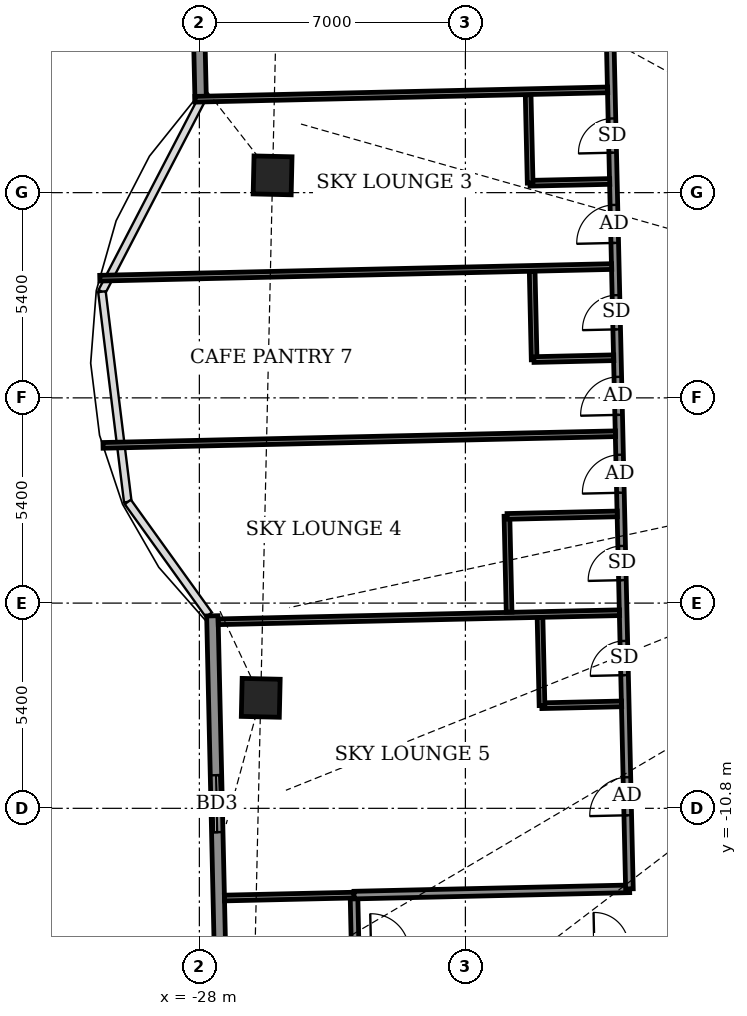
"""IFC4 building model, lengths in metres.
Left out: names, types, materials, properties, quantities, classifications, styles, units other than length and angle.
Written with IfcOpenShell. Run it as: python <this file> out.ifc"""

import sys

from ifc_helpers import new_model, si_unit, direction, frame, frame_2d, origin, origin_2d, place, context, subcontext, project, spatial, rectangle, extrude, element, fill, save


model = new_model("IFC4")
c1 = context("Model", 3, precision=1e-05, world=origin(), true_north=direction((0.0, 1.0)))
c2 = subcontext(c1, "Body", "Model", "MODEL_VIEW")
j1 = project(units=[si_unit("LENGTHUNIT", "METRE"), si_unit("PLANEANGLEUNIT", "RADIAN")], contexts=[c1])
p1 = place(None, origin())
s1 = spatial("IfcSite", under=j1, at=p1, CompositionType="ELEMENT")
p2 = place(p1, origin())
s2 = spatial("IfcBuilding", under=s1, at=p2, CompositionType="ELEMENT")
p3 = place(p2, frame((0.0, 0.0, 275.3)))
s3 = spatial("IfcBuildingStorey", under=s2, at=p3, CompositionType="ELEMENT", Elevation=275.3)
for number, where, z_axis, x_axis in (
    (1, (-26.385, -7.892, -0.55), (0.0, 0.0, 1.0), (-0.023, -1.0, 0.0)),
    (2, (-26.073, 5.855, -0.55), (0.0, 0.0, 1.0), (-0.023, -1.0, 0.0)),
):
    element("IfcColumn", number, at=place(p3, frame(where, z_axis=z_axis, x_axis=x_axis)), inside=s3, PredefinedType="COLUMN", context=c2, shape_type="SweptSolid", body=[
        extrude(rectangle(XDim=1.0, YDim=1.0, at=origin_2d()), origin(), (0.0, 0.0, 1.0), 4.6),
    ])
p4 = place(p3, frame((-28.297, 22.427, 0.0), z_axis=(0.0, 0.0, 1.0), x_axis=(0.02269714286, -0.999742386671, 0.0)))
e3 = element("IfcWall", 3, at=p4, inside=s3, PredefinedType="SOLIDWALL", context=c2, shape_type="SweptSolid", body=[
    extrude(rectangle(XDim=14.629, YDim=0.3, at=frame_2d((7.314, 0.0))), origin(), (0.0, 0.0, 1.0), 2.75),
])
p5 = place(p4, frame((3.7, 0.0, 0.0)))
e4 = element("IfcOpeningElement", 4, at=p5, cuts=e3, PredefinedType="OPENING", context=c2, shape_type="SweptSolid", body=[
    extrude(rectangle(XDim=1.5, YDim=2.4, at=frame_2d((0.75, 1.2))), frame((0.0, 0.16, 0.0), z_axis=(0.0, -1.0, 0.0), x_axis=(1.0, 0.0, 0.0)), (0.0, 0.0, 1.0), 0.32),
])
p6 = place(p4, frame((10.612, 0.0, 0.9)))
e5 = element("IfcOpeningElement", 5, at=p6, cuts=e3, PredefinedType="OPENING", context=c2, shape_type="SweptSolid", body=[
    extrude(rectangle(XDim=2.4, YDim=1.5, at=frame_2d((1.2, 0.75))), frame((0.0, 0.16, 0.0), z_axis=(0.0, -1.0, 0.0), x_axis=(1.0, 0.0, 0.0)), (0.0, 0.0, 1.0), 0.32),
])
p7 = place(p3, frame((-27.658, -5.735, 0.0), z_axis=(0.0, 0.0, 1.0), x_axis=(0.022670092247, -0.999743000434, 0.0)))
e6 = element("IfcWall", 6, at=p7, inside=s3, PredefinedType="SOLIDWALL", context=c2, shape_type="SweptSolid", body=[
    extrude(rectangle(XDim=15.131, YDim=0.3, at=frame_2d((7.565, 0.0))), origin(), (0.0, 0.0, 1.0), 2.35),
])
p8 = place(p7, frame((4.194, 0.0, 0.0)))
e7 = element("IfcOpeningElement", 7, at=p8, cuts=e6, PredefinedType="OPENING", context=c2, shape_type="SweptSolid", body=[
    extrude(rectangle(XDim=1.5, YDim=2.0, at=frame_2d((0.75, 1.0))), frame((0.0, 0.16, 0.0), z_axis=(0.0, -1.0, 0.0), x_axis=(1.0, 0.0, 0.0)), (0.0, 0.0, 1.0), 0.32),
])
p9 = place(p7, frame((11.846, 0.0, 0.5)))
e8 = element("IfcOpeningElement", 8, at=p9, cuts=e6, PredefinedType="OPENING", context=c2, shape_type="SweptSolid", body=[
    extrude(rectangle(XDim=1.2, YDim=1.1, at=frame_2d((0.6, 0.55))), frame((0.0, 0.16, 0.0), z_axis=(0.0, -1.0, 0.0), x_axis=(1.0, 0.0, 0.0)), (0.0, 0.0, 1.0), 0.32),
])
p10 = place(p3, frame((-30.121, -19.075, 0.0), z_axis=(0.0, 0.0, 1.0), x_axis=(-0.022665943652, 0.999743094499, 0.0)))
e9 = element("IfcWall", 9, at=p10, inside=s3, PredefinedType="USERDEFINED", context=c2, shape_type="SweptSolid", body=[
    extrude(rectangle(XDim=6.0, YDim=0.55, at=frame_2d((3.0, 0.0))), origin(), (0.0, 0.0, 1.0), 0.8),
])
p11 = place(p3, frame((-23.898, -14.583, 0.0), z_axis=(0.0, 0.0, 1.0), x_axis=(-0.022617910375, 0.999744182344, 0.0)))
e10 = element("IfcWall", 10, at=p11, inside=s3, PredefinedType="PARTITIONING", context=c2, shape_type="SweptSolid", body=[
    extrude(rectangle(XDim=1.5, YDim=0.2, at=frame_2d((0.75, 0.0))), origin(), (0.0, 0.0, 1.0), 2.65),
])
p12 = place(p3, frame((-23.895, -14.583, 0.0), z_axis=(0.0, 0.0, 1.0), x_axis=(0.999742444101, 0.022694613067, 0.0)))
e11 = element("IfcWall", 11, at=p12, inside=s3, PredefinedType="PARTITIONING", context=c2, shape_type="SweptSolid", body=[
    extrude(rectangle(XDim=54.025, YDim=0.2, at=frame_2d((27.012, 0.0))), origin(), (0.0, 0.0, 1.0), 2.1),
])
p13 = place(p12, frame((0.414, 0.0, 0.0)))
e12 = element("IfcOpeningElement", 12, at=p13, cuts=e11, PredefinedType="OPENING", context=c2, shape_type="SweptSolid", body=[
    extrude(rectangle(XDim=1.0, YDim=2.1, at=frame_2d((0.5, 1.05))), frame((0.0, 0.11, 0.0), z_axis=(0.0, -1.0, 0.0), x_axis=(1.0, 0.0, 0.0)), (0.0, 0.0, 1.0), 0.22),
])
p14 = place(p12, frame((6.289, 0.0, 0.0)))
e13 = element("IfcOpeningElement", 13, at=p14, cuts=e11, PredefinedType="OPENING", context=c2, shape_type="SweptSolid", body=[
    extrude(rectangle(XDim=0.9, YDim=2.1, at=frame_2d((0.45, 1.05))), frame((0.0, 0.11, 0.0), z_axis=(0.0, -1.0, 0.0), x_axis=(1.0, 0.0, 0.0)), (0.0, 0.0, 1.0), 0.22),
])
p15 = place(p12, frame((11.589, 0.0, 0.0)))
e14 = element("IfcOpeningElement", 14, at=p15, cuts=e11, PredefinedType="OPENING", context=c2, shape_type="SweptSolid", body=[
    extrude(rectangle(XDim=1.0, YDim=2.1, at=frame_2d((0.5, 1.05))), frame((0.0, 0.11, 0.0), z_axis=(0.0, -1.0, 0.0), x_axis=(1.0, 0.0, 0.0)), (0.0, 0.0, 1.0), 0.22),
])
p16 = place(p12, frame((8.689, 0.0, 0.0)))
e15 = element("IfcOpeningElement", 15, at=p16, cuts=e11, PredefinedType="OPENING", context=c2, shape_type="SweptSolid", body=[
    extrude(rectangle(XDim=0.9, YDim=2.1, at=frame_2d((0.45, 1.05))), frame((0.0, 0.11, 0.0), z_axis=(0.0, -1.0, 0.0), x_axis=(1.0, 0.0, 0.0)), (0.0, 0.0, 1.0), 0.22),
])
p17 = place(p12, frame((15.014, 0.0, 0.0)))
e16 = element("IfcOpeningElement", 16, at=p17, cuts=e11, PredefinedType="OPENING", context=c2, shape_type="SweptSolid", body=[
    extrude(rectangle(XDim=1.0, YDim=2.1, at=frame_2d((0.5, 1.05))), frame((0.0, 0.11, 0.0), z_axis=(0.0, -1.0, 0.0), x_axis=(1.0, 0.0, 0.0)), (0.0, 0.0, 1.0), 0.22),
])
p18 = place(p12, frame((18.039, 0.0, 0.0)))
e17 = element("IfcOpeningElement", 17, at=p18, cuts=e11, PredefinedType="OPENING", context=c2, shape_type="SweptSolid", body=[
    extrude(rectangle(XDim=0.9, YDim=2.1, at=frame_2d((0.45, 1.05))), frame((0.0, 0.11, 0.0), z_axis=(0.0, -1.0, 0.0), x_axis=(1.0, 0.0, 0.0)), (0.0, 0.0, 1.0), 0.22),
])
p19 = place(p12, frame((22.989, 0.0, 0.0)))
e18 = element("IfcOpeningElement", 18, at=p19, cuts=e11, PredefinedType="OPENING", context=c2, shape_type="SweptSolid", body=[
    extrude(rectangle(XDim=0.9, YDim=2.1, at=frame_2d((0.45, 1.05))), frame((0.0, 0.11, 0.0), z_axis=(0.0, -1.0, 0.0), x_axis=(1.0, 0.0, 0.0)), (0.0, 0.0, 1.0), 0.22),
])
p20 = place(p12, frame((25.514, 0.0, 0.0)))
e19 = element("IfcOpeningElement", 19, at=p20, cuts=e11, PredefinedType="OPENING", context=c2, shape_type="SweptSolid", body=[
    extrude(rectangle(XDim=0.9, YDim=2.1, at=frame_2d((0.45, 1.05))), frame((0.0, 0.11, 0.0), z_axis=(0.0, -1.0, 0.0), x_axis=(1.0, 0.0, 0.0)), (0.0, 0.0, 1.0), 0.22),
])
p21 = place(p12, frame((32.839, 0.0, 0.0)))
e20 = element("IfcOpeningElement", 20, at=p21, cuts=e11, PredefinedType="OPENING", context=c2, shape_type="SweptSolid", body=[
    extrude(rectangle(XDim=0.9, YDim=2.1, at=frame_2d((0.45, 1.05))), frame((0.0, 0.11, 0.0), z_axis=(0.0, -1.0, 0.0), x_axis=(1.0, 0.0, 0.0)), (0.0, 0.0, 1.0), 0.22),
])
p22 = place(p12, frame((35.364, 0.0, 0.0)))
e21 = element("IfcOpeningElement", 21, at=p22, cuts=e11, PredefinedType="OPENING", context=c2, shape_type="SweptSolid", body=[
    extrude(rectangle(XDim=0.9, YDim=2.1, at=frame_2d((0.45, 1.05))), frame((0.0, 0.11, 0.0), z_axis=(0.0, -1.0, 0.0), x_axis=(1.0, 0.0, 0.0)), (0.0, 0.0, 1.0), 0.22),
])
p23 = place(p12, frame((43.939, 0.0, 0.0)))
e22 = element("IfcOpeningElement", 22, at=p23, cuts=e11, PredefinedType="OPENING", context=c2, shape_type="SweptSolid", body=[
    extrude(rectangle(XDim=1.0, YDim=2.1, at=frame_2d((0.5, 1.05))), frame((0.0, 0.11, 0.0), z_axis=(0.0, -1.0, 0.0), x_axis=(1.0, 0.0, 0.0)), (0.0, 0.0, 1.0), 0.22),
])
p24 = place(p12, frame((40.339, 0.0, 0.0)))
e23 = element("IfcOpeningElement", 23, at=p24, cuts=e11, PredefinedType="OPENING", context=c2, shape_type="SweptSolid", body=[
    extrude(rectangle(XDim=0.9, YDim=2.1, at=frame_2d((0.45, 1.05))), frame((0.0, 0.11, 0.0), z_axis=(0.0, -1.0, 0.0), x_axis=(1.0, 0.0, 0.0)), (0.0, 0.0, 1.0), 0.22),
])
p25 = place(p12, frame((50.035, 0.0, 0.0)))
e24 = element("IfcOpeningElement", 24, at=p25, cuts=e11, PredefinedType="OPENING", context=c2, shape_type="SweptSolid", body=[
    extrude(rectangle(XDim=1.0, YDim=2.1, at=frame_2d((0.5, 1.05))), frame((0.0, 0.11, 0.0), z_axis=(0.0, -1.0, 0.0), x_axis=(1.0, 0.0, 0.0)), (0.0, 0.0, 1.0), 0.22),
])
p26 = place(p3, frame((-27.34, -13.16, 0.0), z_axis=(0.0, 0.0, 1.0), x_axis=(0.999745956294, 0.022539362742, 0.0)))
e25 = element("IfcWall", 25, at=p26, inside=s3, PredefinedType="PARTITIONING", context=c2, shape_type="SweptSolid", body=[
    extrude(rectangle(XDim=3.412, YDim=0.15, at=frame_2d((1.706, 0.0))), origin(), (0.0, 0.0, 1.0), 2.35),
])
p27 = place(p3, frame((-23.929, -13.083, 0.0), z_axis=(0.0, 0.0, 1.0), x_axis=(0.999741000612, 0.022758112756, 0.0)))
e26 = element("IfcWall", 26, at=p27, inside=s3, PredefinedType="PARTITIONING", context=c2, shape_type="SweptSolid", body=[
    extrude(rectangle(XDim=7.252, YDim=0.2, at=frame_2d((3.626, 0.0))), origin(), (0.0, 0.0, 1.0), 2.55),
])
p28 = place(p3, frame((-16.684, -12.919, 0.0), z_axis=(0.0, 0.0, 1.0), x_axis=(-0.022712214871, 0.999742044377, 0.0)))
e27 = element("IfcWall", 27, at=p28, inside=s3, PredefinedType="PARTITIONING", context=c2, shape_type="SweptSolid", body=[
    extrude(rectangle(XDim=26.551, YDim=0.2, at=frame_2d((13.275, 0.0))), origin(), (0.0, 0.0, 1.0), 2.55),
])
p29 = place(p28, frame((22.088, 0.0, 0.0)))
e28 = element("IfcOpeningElement", 28, at=p29, cuts=e27, PredefinedType="OPENING", context=c2, shape_type="SweptSolid", body=[
    extrude(rectangle(XDim=1.0, YDim=2.1, at=frame_2d((0.5, 1.05))), frame((0.0, 0.11, 0.0), z_axis=(0.0, -1.0, 0.0), x_axis=(1.0, 0.0, 0.0)), (0.0, 0.0, 1.0), 0.22),
])
p30 = place(p28, frame((24.9, 0.0, 0.0)))
e29 = element("IfcOpeningElement", 29, at=p30, cuts=e27, PredefinedType="OPENING", context=c2, shape_type="SweptSolid", body=[
    extrude(rectangle(XDim=0.9, YDim=2.1, at=frame_2d((0.45, 1.05))), frame((0.0, 0.11, 0.0), z_axis=(0.0, -1.0, 0.0), x_axis=(1.0, 0.0, 0.0)), (0.0, 0.0, 1.0), 0.22),
])
p31 = place(p28, frame((17.0, 0.0, 0.0)))
e30 = element("IfcOpeningElement", 30, at=p31, cuts=e27, PredefinedType="OPENING", context=c2, shape_type="SweptSolid", body=[
    extrude(rectangle(XDim=1.0, YDim=2.1, at=frame_2d((0.5, 1.05))), frame((0.0, 0.11, 0.0), z_axis=(0.0, -1.0, 0.0), x_axis=(1.0, 0.0, 0.0)), (0.0, 0.0, 1.0), 0.22),
])
p32 = place(p28, frame((19.375, 0.0, 0.0)))
e31 = element("IfcOpeningElement", 31, at=p32, cuts=e27, PredefinedType="OPENING", context=c2, shape_type="SweptSolid", body=[
    extrude(rectangle(XDim=0.9, YDim=2.1, at=frame_2d((0.45, 1.05))), frame((0.0, 0.11, 0.0), z_axis=(0.0, -1.0, 0.0), x_axis=(1.0, 0.0, 0.0)), (0.0, 0.0, 1.0), 0.22),
])
p33 = place(p28, frame((12.475, 0.0, 0.0)))
e32 = element("IfcOpeningElement", 32, at=p33, cuts=e27, PredefinedType="OPENING", context=c2, shape_type="SweptSolid", body=[
    extrude(rectangle(XDim=1.0, YDim=2.1, at=frame_2d((0.5, 1.05))), frame((0.0, 0.11, 0.0), z_axis=(0.0, -1.0, 0.0), x_axis=(1.0, 0.0, 0.0)), (0.0, 0.0, 1.0), 0.22),
])
p34 = place(p28, frame((14.725, 0.0, 0.0)))
e33 = element("IfcOpeningElement", 33, at=p34, cuts=e27, PredefinedType="OPENING", context=c2, shape_type="SweptSolid", body=[
    extrude(rectangle(XDim=0.9, YDim=2.1, at=frame_2d((0.45, 1.05))), frame((0.0, 0.11, 0.0), z_axis=(0.0, -1.0, 0.0), x_axis=(1.0, 0.0, 0.0)), (0.0, 0.0, 1.0), 0.22),
])
p35 = place(p28, frame((10.425, 0.0, 0.0)))
e34 = element("IfcOpeningElement", 34, at=p35, cuts=e27, PredefinedType="OPENING", context=c2, shape_type="SweptSolid", body=[
    extrude(rectangle(XDim=1.0, YDim=2.1, at=frame_2d((0.5, 1.05))), frame((0.0, 0.11, 0.0), z_axis=(0.0, -1.0, 0.0), x_axis=(1.0, 0.0, 0.0)), (0.0, 0.0, 1.0), 0.22),
])
p36 = place(p28, frame((8.125, 0.0, 0.0)))
e35 = element("IfcOpeningElement", 35, at=p36, cuts=e27, PredefinedType="OPENING", context=c2, shape_type="SweptSolid", body=[
    extrude(rectangle(XDim=0.9, YDim=2.1, at=frame_2d((0.45, 1.05))), frame((0.0, 0.11, 0.0), z_axis=(0.0, -1.0, 0.0), x_axis=(1.0, 0.0, 0.0)), (0.0, 0.0, 1.0), 0.22),
])
p37 = place(p28, frame((1.937, 0.0, 0.0)))
e36 = element("IfcOpeningElement", 36, at=p37, cuts=e27, PredefinedType="OPENING", context=c2, shape_type="SweptSolid", body=[
    extrude(rectangle(XDim=1.0, YDim=2.1, at=frame_2d((0.5, 1.05))), frame((0.0, 0.11, 0.0), z_axis=(0.0, -1.0, 0.0), x_axis=(1.0, 0.0, 0.0)), (0.0, 0.0, 1.0), 0.22),
])
p38 = place(p28, frame((5.625, 0.0, 0.0)))
e37 = element("IfcOpeningElement", 37, at=p38, cuts=e27, PredefinedType="OPENING", context=c2, shape_type="SweptSolid", body=[
    extrude(rectangle(XDim=0.9, YDim=2.1, at=frame_2d((0.45, 1.05))), frame((0.0, 0.11, 0.0), z_axis=(0.0, -1.0, 0.0), x_axis=(1.0, 0.0, 0.0)), (0.0, 0.0, 1.0), 0.22),
])
p39 = place(p3, frame((-18.989, -8.1, 0.0), z_axis=(0.0, 0.0, 1.0), x_axis=(0.999737616439, 0.022906293375, 0.0)))
e38 = element("IfcWall", 38, at=p39, inside=s3, PredefinedType="PARTITIONING", context=c2, shape_type="SweptSolid", body=[
    extrude(rectangle(XDim=2.1, YDim=0.15, at=frame_2d((1.05, 0.0))), origin(), (0.0, 0.0, 1.0), 2.75),
])
p40 = place(p3, frame((-18.984, -8.095, 0.0), z_axis=(0.0, 0.0, 1.0), x_axis=(-0.022885950011, 0.999738082346, 0.0)))
e39 = element("IfcWall", 39, at=p40, inside=s3, PredefinedType="PARTITIONING", context=c2, shape_type="SweptSolid", body=[
    extrude(rectangle(XDim=2.325, YDim=0.15, at=frame_2d((1.163, 0.0))), origin(), (0.0, 0.0, 1.0), 2.75),
])
p41 = place(p3, frame((-27.504, -5.892, 0.0), z_axis=(0.0, 0.0, 1.0), x_axis=(0.999743943334, 0.022628472488, 0.0)))
e40 = element("IfcWall", 40, at=p41, inside=s3, PredefinedType="PARTITIONING", context=c2, shape_type="SweptSolid", body=[
    extrude(rectangle(XDim=10.562, YDim=0.15, at=frame_2d((5.281, 0.0))), origin(), (0.0, 0.0, 1.0), 2.35),
])
p42 = place(p3, frame((-19.85, -5.639, 0.0), z_axis=(0.0, 0.0, 1.0), x_axis=(-0.022523775833, 0.999746307581, 0.0)))
e41 = element("IfcWall", 41, at=p42, inside=s3, PredefinedType="PARTITIONING", context=c2, shape_type="SweptSolid", body=[
    extrude(rectangle(XDim=2.526, YDim=0.15, at=frame_2d((1.263, 0.0))), origin(), (0.0, 0.0, 1.0), 2.85),
])
p43 = place(p3, frame((-19.902, -3.119, 0.0), z_axis=(0.0, 0.0, 1.0), x_axis=(0.999741618182, 0.022730967319, 0.0)))
e42 = element("IfcWall", 42, at=p43, inside=s3, PredefinedType="PARTITIONING", context=c2, shape_type="SweptSolid", body=[
    extrude(rectangle(XDim=2.9, YDim=0.15, at=frame_2d((1.45, 0.0))), origin(), (0.0, 0.0, 1.0), 2.85),
])
p44 = place(p3, frame((-30.535, -1.25, 0.0), z_axis=(0.0, 0.0, 1.0), x_axis=(0.999742750552, 0.022681109296, 0.0)))
e43 = element("IfcWall", 43, at=p44, inside=s3, PredefinedType="PARTITIONING", context=c2, shape_type="SweptSolid", body=[
    extrude(rectangle(XDim=13.487, YDim=0.15, at=frame_2d((6.744, 0.0))), origin(), (0.0, 0.0, 1.0), 0.93),
])
p45 = place(p3, frame((-19.191, 1.003, 0.0), z_axis=(0.0, 0.0, 1.0), x_axis=(-0.022361308448, 0.999749954681, 0.0)))
e44 = element("IfcWall", 44, at=p45, inside=s3, PredefinedType="PARTITIONING", context=c2, shape_type="SweptSolid", body=[
    extrude(rectangle(XDim=2.325, YDim=0.15, at=frame_2d((1.163, 0.0))), origin(), (0.0, 0.0, 1.0), 4.05),
])
p46 = place(p3, frame((-19.196, 1.008, 0.0), z_axis=(0.0, 0.0, 1.0), x_axis=(0.999740513837, 0.022779486249, 0.0)))
e45 = element("IfcWall", 45, at=p46, inside=s3, PredefinedType="PARTITIONING", context=c2, shape_type="SweptSolid", body=[
    extrude(rectangle(XDim=2.101, YDim=0.15, at=frame_2d((1.05, 0.0))), origin(), (0.0, 0.0, 1.0), 4.05),
])
p47 = place(p3, frame((-30.62, 3.149, 0.0), z_axis=(0.0, 0.0, 1.0), x_axis=(0.99974177941, 0.022723875138, 0.0)))
e46 = element("IfcWall", 46, at=p47, inside=s3, PredefinedType="PARTITIONING", context=c2, shape_type="SweptSolid", body=[
    extrude(rectangle(XDim=13.473, YDim=0.15, at=frame_2d((6.736, 0.0))), origin(), (0.0, 0.0, 1.0), 0.93),
])
p48 = place(p3, frame((-19.301, 5.647, 0.0), z_axis=(0.0, 0.0, 1.0), x_axis=(0.999748159451, 0.022441427631, 0.0)))
e47 = element("IfcWall", 47, at=p48, inside=s3, PredefinedType="PARTITIONING", context=c2, shape_type="SweptSolid", body=[
    extrude(rectangle(XDim=2.1, YDim=0.15, at=frame_2d((1.05, 0.0))), origin(), (0.0, 0.0, 1.0), 2.85),
])
p49 = place(p3, frame((-19.296, 5.652, 0.0), z_axis=(0.0, 0.0, 1.0), x_axis=(-0.022895561926, 0.999737862264, 0.0)))
e48 = element("IfcWall", 48, at=p49, inside=s3, PredefinedType="PARTITIONING", context=c2, shape_type="SweptSolid", body=[
    extrude(rectangle(XDim=2.324, YDim=0.15, at=frame_2d((1.162, 0.0))), origin(), (0.0, 0.0, 1.0), 2.85),
])
p50 = place(p3, frame((-28.116, 7.857, 0.0), z_axis=(0.0, 0.0, 1.0), x_axis=(0.999741301527, 0.022744890004, 0.0)))
e49 = element("IfcWall", 49, at=p50, inside=s3, PredefinedType="PARTITIONING", context=c2, shape_type="SweptSolid", body=[
    extrude(rectangle(XDim=10.863, YDim=0.15, at=frame_2d((5.431, 0.0))), origin(), (0.0, 0.0, 1.0), 2.35),
])
p51 = place(p8, origin())
e50 = element("IfcDoor", 50, at=p51, inside=s3, OperationType="SLIDING_TO_LEFT", PredefinedType="DOOR", context=c2, shape_type="SweptSolid", body=[
    extrude(rectangle(XDim=1.5, YDim=2.0, at=frame_2d((0.75, 1.0))), frame((0.0, 0.025, 0.0), z_axis=(0.0, -1.0, 0.0), x_axis=(1.0, 0.0, 0.0)), (0.0, 0.0, 1.0), 0.05),
])
fill(e7, e50)
p52 = place(p31, origin())
e51 = element("IfcDoor", 51, at=p52, inside=s3, OperationType="SINGLE_SWING_LEFT", PredefinedType="DOOR", context=c2, shape_type="SweptSolid", body=[
    extrude(rectangle(XDim=1.0, YDim=2.1, at=frame_2d((0.5, 1.05))), frame((0.0, 0.025, 0.0), z_axis=(0.0, -1.0, 0.0), x_axis=(1.0, 0.0, 0.0)), (0.0, 0.0, 1.0), 0.05),
])
fill(e30, e51)
p53 = place(p32, origin())
e52 = element("IfcDoor", 52, at=p53, inside=s3, OperationType="SINGLE_SWING_LEFT", PredefinedType="DOOR", context=c2, shape_type="SweptSolid", body=[
    extrude(rectangle(XDim=0.9, YDim=2.1, at=frame_2d((0.45, 1.05))), frame((0.0, 0.025, 0.0), z_axis=(0.0, -1.0, 0.0), x_axis=(1.0, 0.0, 0.0)), (0.0, 0.0, 1.0), 0.05),
])
fill(e31, e52)
p54 = place(p33, origin())
e53 = element("IfcDoor", 53, at=p54, inside=s3, OperationType="SINGLE_SWING_RIGHT", PredefinedType="DOOR", context=c2, shape_type="SweptSolid", body=[
    extrude(rectangle(XDim=1.0, YDim=2.1, at=frame_2d((0.5, 1.05))), frame((0.0, 0.025, 0.0), z_axis=(0.0, -1.0, 0.0), x_axis=(1.0, 0.0, 0.0)), (0.0, 0.0, 1.0), 0.05),
])
fill(e32, e53)
p55 = place(p34, origin())
e54 = element("IfcDoor", 54, at=p55, inside=s3, OperationType="SINGLE_SWING_RIGHT", PredefinedType="DOOR", context=c2, shape_type="SweptSolid", body=[
    extrude(rectangle(XDim=0.9, YDim=2.1, at=frame_2d((0.45, 1.05))), frame((0.0, 0.025, 0.0), z_axis=(0.0, -1.0, 0.0), x_axis=(1.0, 0.0, 0.0)), (0.0, 0.0, 1.0), 0.05),
])
fill(e33, e54)
p56 = place(p35, origin())
e55 = element("IfcDoor", 55, at=p56, inside=s3, OperationType="SINGLE_SWING_LEFT", PredefinedType="DOOR", context=c2, shape_type="SweptSolid", body=[
    extrude(rectangle(XDim=1.0, YDim=2.1, at=frame_2d((0.5, 1.05))), frame((0.0, 0.025, 0.0), z_axis=(0.0, -1.0, 0.0), x_axis=(1.0, 0.0, 0.0)), (0.0, 0.0, 1.0), 0.05),
])
fill(e34, e55)
p57 = place(p36, origin())
e56 = element("IfcDoor", 56, at=p57, inside=s3, OperationType="SINGLE_SWING_LEFT", PredefinedType="DOOR", context=c2, shape_type="SweptSolid", body=[
    extrude(rectangle(XDim=0.9, YDim=2.1, at=frame_2d((0.45, 1.05))), frame((0.0, 0.025, 0.0), z_axis=(0.0, -1.0, 0.0), x_axis=(1.0, 0.0, 0.0)), (0.0, 0.0, 1.0), 0.05),
])
fill(e35, e56)
p58 = place(p37, origin())
e57 = element("IfcDoor", 57, at=p58, inside=s3, OperationType="SINGLE_SWING_RIGHT", PredefinedType="DOOR", context=c2, shape_type="SweptSolid", body=[
    extrude(rectangle(XDim=1.0, YDim=2.1, at=frame_2d((0.5, 1.05))), frame((0.0, 0.025, 0.0), z_axis=(0.0, -1.0, 0.0), x_axis=(1.0, 0.0, 0.0)), (0.0, 0.0, 1.0), 0.05),
])
fill(e36, e57)
p59 = place(p38, origin())
e58 = element("IfcDoor", 58, at=p59, inside=s3, OperationType="SINGLE_SWING_RIGHT", PredefinedType="DOOR", context=c2, shape_type="SweptSolid", body=[
    extrude(rectangle(XDim=0.9, YDim=2.1, at=frame_2d((0.45, 1.05))), frame((0.0, 0.025, 0.0), z_axis=(0.0, -1.0, 0.0), x_axis=(1.0, 0.0, 0.0)), (0.0, 0.0, 1.0), 0.05),
])
fill(e37, e58)
save(model, sys.argv[1])
